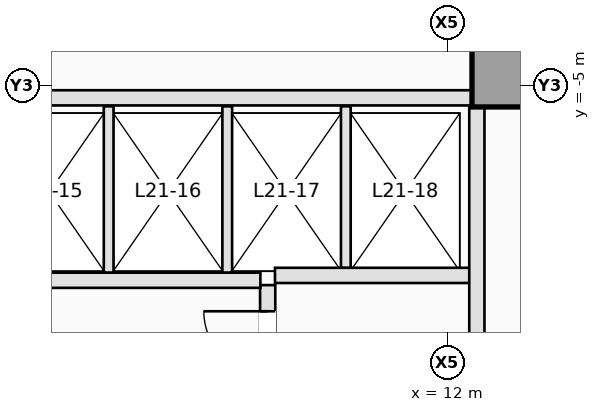
"""IFC4 building model, lengths in metres.
Left out: names, types, materials, properties, quantities, classifications, styles, units other than length and angle.
Written with IfcOpenShell. Run it as: python <this file> out.ifc"""

import sys

from ifc_helpers import new_model, si_unit, direction, frame, frame_2d, origin, origin_2d, place, context, subcontext, project, spatial, rectangle, extrude, element, fill, save


model = new_model("IFC4")
c1 = context("Model", 3, precision=1e-05, world=origin(), true_north=direction((0.0, 1.0)))
c2 = subcontext(c1, "Body", "Model", "MODEL_VIEW")
j1 = project(units=[si_unit("LENGTHUNIT", "METRE"), si_unit("PLANEANGLEUNIT", "RADIAN")], contexts=[c1])
p1 = place(None, origin())
s1 = spatial("IfcSite", under=j1, at=p1, CompositionType="ELEMENT")
p2 = place(p1, origin())
s2 = spatial("IfcBuilding", under=s1, at=p2, CompositionType="ELEMENT")
p3 = place(p2, frame((0.0, 0.0, 80.1)))
s3 = spatial("IfcBuildingStorey", under=s2, at=p3, CompositionType="ELEMENT", Elevation=80.1)
p4 = place(p3, frame((12.95, -4.8, 0.0), z_axis=(0.0, 0.0, 1.0), x_axis=(1.0, 0.0, 0.0)))
e1 = element("IfcColumn", 1, at=p4, inside=s3, PredefinedType="COLUMN", context=c2, shape_type="SweptSolid", body=[
    extrude(rectangle(XDim=1.1, YDim=1.1, at=origin_2d()), origin(), (0.0, 0.0, 1.0), 3.5),
])
p5 = place(p3, frame((9.04, -10.18, 0.0), z_axis=(0.0, 0.0, 1.0), x_axis=(0.0, 1.0, 0.0)))
e2 = element("IfcWall", 2, at=p5, inside=s3, PredefinedType="PARTITIONING", context=c2, shape_type="SweptSolid", body=[
    extrude(rectangle(XDim=1.9, YDim=0.25, at=frame_2d((0.95, 0.0))), origin(), (0.0, 0.0, 1.0), 3.25),
])
p6 = place(p5, frame((0.42, 0.0, 0.0)))
e3 = element("IfcOpeningElement", 3, at=p6, cuts=e2, PredefinedType="OPENING", context=c2, shape_type="SweptSolid", body=[
    extrude(rectangle(XDim=1.05, YDim=2.15, at=frame_2d((0.525, 1.075))), frame((0.0, 0.135, 0.0), z_axis=(0.0, -1.0, 0.0), x_axis=(1.0, 0.0, 0.0)), (0.0, 0.0, 1.0), 0.27),
])
p7 = place(p3, frame((9.16, -8.12, 0.0), z_axis=(0.0, 0.0, 1.0), x_axis=(1.0, 0.0, 0.0)))
e4 = element("IfcWall", 4, at=p7, inside=s3, PredefinedType="PARTITIONING", context=c2, shape_type="SweptSolid", body=[
    extrude(rectangle(XDim=3.22, YDim=0.25, at=frame_2d((1.61, 0.0))), origin(), (0.0, 0.0, 1.0), 3.25),
])
p8 = place(p3, frame((12.48, -10.18, 0.0), z_axis=(0.0, 0.0, 1.0), x_axis=(0.0, 1.0, 0.0)))
e5 = element("IfcWall", 5, at=p8, inside=s3, PredefinedType="PARTITIONING", context=c2, shape_type="SweptSolid", body=[
    extrude(rectangle(XDim=4.828, YDim=0.25, at=frame_2d((2.414, 0.0))), origin(), (0.0, 0.0, 1.0), 3.25),
])
p9 = place(p3, frame((3.68, -8.2, 0.0), z_axis=(0.0, 0.0, 1.0), x_axis=(1.0, 0.0, 0.0)))
e6 = element("IfcWall", 6, at=p9, inside=s3, PredefinedType="PARTITIONING", context=c2, shape_type="SweptSolid", body=[
    extrude(rectangle(XDim=5.24, YDim=0.25, at=frame_2d((2.62, 0.0))), origin(), (0.0, 0.0, 1.0), 3.25),
])
p10 = place(p3, frame((4.302, -5.2, 0.0), z_axis=(0.0, 0.0, 1.0), x_axis=(1.0, 0.0, 0.0)))
e7 = element("IfcWall", 7, at=p10, inside=s3, PredefinedType="PARTITIONING", context=c2, shape_type="SweptSolid", body=[
    extrude(rectangle(XDim=8.096, YDim=0.25, at=frame_2d((4.048, 0.0))), origin(), (0.0, 0.0, 1.0), 3.25),
])
for number, where, z_axis, x_axis in (
    (8, (6.425, -8.073, 0.0), (0.0, 0.0, 1.0), (0.0, 1.0, 0.0)),
    (9, (8.375, -8.073, 0.0), (0.0, 0.0, 1.0), (0.0, 1.0, 0.0)),
):
    element("IfcWall", number, at=place(p3, frame(where, z_axis=z_axis, x_axis=x_axis)), inside=s3, PredefinedType="PARTITIONING", context=c2, shape_type="SweptSolid", body=[
        extrude(rectangle(XDim=2.733, YDim=0.16, at=frame_2d((1.366, 0.0))), origin(), (0.0, 0.0, 1.0), 3.25),
    ])
p11 = place(p3, frame((10.325, -7.993, 0.0), z_axis=(0.0, 0.0, 1.0), x_axis=(0.0, 1.0, 0.0)))
e10 = element("IfcWall", 10, at=p11, inside=s3, PredefinedType="PARTITIONING", context=c2, shape_type="SweptSolid", body=[
    extrude(rectangle(XDim=2.653, YDim=0.16, at=frame_2d((1.326, 0.0))), origin(), (0.0, 0.0, 1.0), 3.25),
])
p12 = place(p6, origin())
e11 = element("IfcDoor", 11, at=p12, inside=s3, OperationType="SINGLE_SWING_RIGHT", PredefinedType="DOOR", context=c2, shape_type="SweptSolid", body=[
    extrude(rectangle(XDim=1.05, YDim=2.15, at=frame_2d((0.525, 1.075))), frame((0.0, 0.025, 0.0), z_axis=(0.0, -1.0, 0.0), x_axis=(1.0, 0.0, 0.0)), (0.0, 0.0, 1.0), 0.05),
])
fill(e3, e11)
save(model, sys.argv[1])
